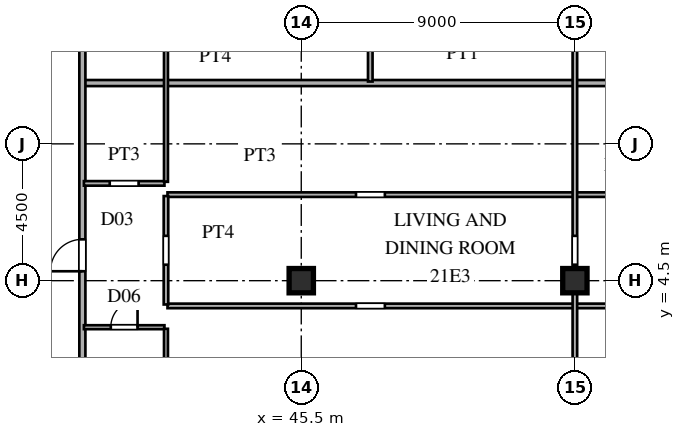
"""IFC4 building model, lengths in metres.
Left out: names, types, materials, properties, quantities, classifications, styles, units other than length and angle.
Written with IfcOpenShell. Run it as: python <this file> out.ifc"""

import sys

from ifc_helpers import new_model, si_unit, direction, frame, frame_2d, origin, origin_2d, place, context, subcontext, project, spatial, rectangle, i_section, extrude, source, transform, mapped, element, fill, save


model = new_model("IFC4")
c1 = context("Model", 3, precision=1e-05, world=origin(), true_north=direction((0.0, 1.0)))
c2 = subcontext(c1, "Body", "Model", "MODEL_VIEW")
j1 = project(units=[si_unit("LENGTHUNIT", "METRE"), si_unit("PLANEANGLEUNIT", "RADIAN")], contexts=[c1])
p1 = place(None, origin())
s1 = spatial("IfcSite", under=j1, at=p1, CompositionType="ELEMENT")
p2 = place(p1, origin())
s2 = spatial("IfcBuilding", under=s1, at=p2, CompositionType="ELEMENT")
p3 = place(p2, frame((0.0, 0.0, 80.1)))
s3 = spatial("IfcBuildingStorey", under=s2, at=p3, CompositionType="ELEMENT", Elevation=80.1)
m1 = source(origin(), c2, "Body", "SweptSolid", [
    extrude(i_section(OverallWidth=0.8, OverallDepth=0.8, WebThickness=0.032, FlangeThickness=0.05, at=origin_2d()), origin(), (0.0, 0.0, 1.0), 3.6),
])
for number, where, z_axis, x_axis in (
    (1, (45.5, 4.5, 0.0), (0.0, 0.0, 1.0), (1.0, 0.0, 0.0)),
    (2, (54.5, 4.5, 0.0), (0.0, 0.0, 1.0), (1.0, 0.0, 0.0)),
):
    element("IfcColumn", number, at=place(p3, frame(where, z_axis=z_axis, x_axis=x_axis)), inside=s3, PredefinedType="COLUMN", context=c2, shape_type="MappedRepresentation", body=[
        mapped(m1, transform((0.0, 0.0, 0.0), scale=1.0)),
    ])
p4 = place(p3, frame((38.35, 2.97, 0.0), z_axis=(0.0, 0.0, 1.0), x_axis=(1.0, 0.0, 0.0)))
e3 = element("IfcWall", 3, at=p4, inside=s3, PredefinedType="PARTITIONING", context=c2, shape_type="SweptSolid", body=[
    extrude(rectangle(XDim=2.65, YDim=0.13, at=frame_2d((1.325, 0.0))), origin(), (0.0, 0.0, 1.0), 3.38),
])
p5 = place(p4, frame((0.885, 0.0, 0.0)))
e4 = element("IfcOpeningElement", 4, at=p5, cuts=e3, PredefinedType="OPENING", context=c2, shape_type="SweptSolid", body=[
    extrude(rectangle(XDim=0.88, YDim=2.1, at=frame_2d((0.44, 1.05))), frame((0.0, 0.075, 0.0), z_axis=(0.0, -1.0, 0.0), x_axis=(1.0, 0.0, 0.0)), (0.0, 0.0, 1.0), 0.15),
])
p6 = place(p3, frame((41.1, 3.67, 0.0), z_axis=(0.0, 0.0, 1.0), x_axis=(1.0, 0.0, 0.0)))
e5 = element("IfcWall", 5, at=p6, inside=s3, PredefinedType="PARTITIONING", context=c2, shape_type="SweptSolid", body=[
    extrude(rectangle(XDim=29.935, YDim=0.15, at=frame_2d((14.967, 0.0))), origin(), (0.0, 0.0, 1.0), 3.38),
])
p7 = place(p6, frame((6.2, 0.0, 0.0)))
e6 = element("IfcOpeningElement", 6, at=p7, cuts=e5, PredefinedType="OPENING", context=c2, shape_type="SweptSolid", body=[
    extrude(rectangle(XDim=0.95, YDim=2.15, at=frame_2d((0.475, 1.075))), frame((0.0, 0.085, 0.0), z_axis=(0.0, -1.0, 0.0), x_axis=(1.0, 0.0, 0.0)), (0.0, 0.0, 1.0), 0.17),
])
p8 = place(p6, frame((15.775, 0.0, 0.0)))
e7 = element("IfcOpeningElement", 7, at=p8, cuts=e5, PredefinedType="OPENING", context=c2, shape_type="SweptSolid", body=[
    extrude(rectangle(XDim=0.95, YDim=2.15, at=frame_2d((0.475, 1.075))), frame((0.0, 0.085, 0.0), z_axis=(0.0, -1.0, 0.0), x_axis=(1.0, 0.0, 0.0)), (0.0, 0.0, 1.0), 0.17),
])
p9 = place(p3, frame((41.1, 7.33, 0.0), z_axis=(0.0, 0.0, 1.0), x_axis=(1.0, 0.0, 0.0)))
e8 = element("IfcWall", 8, at=p9, inside=s3, PredefinedType="PARTITIONING", context=c2, shape_type="SweptSolid", body=[
    extrude(rectangle(XDim=29.775, YDim=0.15, at=frame_2d((14.887, 0.0))), origin(), (0.0, 0.0, 1.0), 3.38),
])
p10 = place(p9, frame((6.2, 0.0, 0.0)))
e9 = element("IfcOpeningElement", 9, at=p10, cuts=e8, PredefinedType="OPENING", context=c2, shape_type="SweptSolid", body=[
    extrude(rectangle(XDim=0.95, YDim=2.15, at=frame_2d((0.475, 1.075))), frame((0.0, 0.085, 0.0), z_axis=(0.0, -1.0, 0.0), x_axis=(1.0, 0.0, 0.0)), (0.0, 0.0, 1.0), 0.17),
])
p11 = place(p9, frame((15.775, 0.0, 0.0)))
e10 = element("IfcOpeningElement", 10, at=p11, cuts=e8, PredefinedType="OPENING", context=c2, shape_type="SweptSolid", body=[
    extrude(rectangle(XDim=0.95, YDim=2.15, at=frame_2d((0.475, 1.075))), frame((0.0, 0.085, 0.0), z_axis=(0.0, -1.0, 0.0), x_axis=(1.0, 0.0, 0.0)), (0.0, 0.0, 1.0), 0.17),
])
p12 = place(p3, frame((38.35, 7.7, 0.0), z_axis=(0.0, 0.0, 1.0), x_axis=(1.0, 0.0, 0.0)))
e11 = element("IfcWall", 11, at=p12, inside=s3, PredefinedType="PARTITIONING", context=c2, shape_type="SweptSolid", body=[
    extrude(rectangle(XDim=2.65, YDim=0.15, at=frame_2d((1.325, 0.0))), origin(), (0.0, 0.0, 1.0), 3.38),
])
p13 = place(p12, frame((0.85, 0.0, 0.0)))
e12 = element("IfcOpeningElement", 12, at=p13, cuts=e11, PredefinedType="OPENING", context=c2, shape_type="SweptSolid", body=[
    extrude(rectangle(XDim=0.95, YDim=2.15, at=frame_2d((0.475, 1.075))), frame((0.0, 0.085, 0.0), z_axis=(0.0, -1.0, 0.0), x_axis=(1.0, 0.0, 0.0)), (0.0, 0.0, 1.0), 0.17),
])
p14 = place(p3, frame((38.38, 11.0, 0.0), z_axis=(0.0, 0.0, 1.0), x_axis=(1.0, 0.0, 0.0)))
e13 = element("IfcWall", 13, at=p14, inside=s3, PredefinedType="PARTITIONING", context=c2, shape_type="SweptSolid", body=[
    extrude(rectangle(XDim=24.854, YDim=0.2, at=frame_2d((12.427, 0.0))), origin(), (0.0, 0.0, 1.0), 3.38),
])
p15 = place(p3, frame((38.3, -15.515, 0.0), z_axis=(0.0, 0.0, 1.0), x_axis=(0.0, 1.0, 0.0)))
e14 = element("IfcWall", 14, at=p15, inside=s3, PredefinedType="PARTITIONING", context=c2, shape_type="SweptSolid", body=[
    extrude(rectangle(XDim=31.03, YDim=0.2, at=frame_2d((15.515, 0.0))), origin(), (0.0, 0.0, 1.0), 3.38),
])
p16 = place(p15, frame((0.16, 0.0, 0.0)))
e15 = element("IfcOpeningElement", 15, at=p16, cuts=e14, PredefinedType="OPENING", context=c2, shape_type="SweptSolid", body=[
    extrude(rectangle(XDim=1.05, YDim=2.25, at=frame_2d((0.525, 1.125))), frame((0.0, 0.11, 0.0), z_axis=(0.0, -1.0, 0.0), x_axis=(1.0, 0.0, 0.0)), (0.0, 0.0, 1.0), 0.22),
])
p17 = place(p15, frame((9.067, 0.0, 0.0)))
e16 = element("IfcOpeningElement", 16, at=p17, cuts=e14, PredefinedType="OPENING", context=c2, shape_type="SweptSolid", body=[
    extrude(rectangle(XDim=1.05, YDim=2.25, at=frame_2d((0.525, 1.125))), frame((0.0, 0.11, 0.0), z_axis=(0.0, -1.0, 0.0), x_axis=(1.0, 0.0, 0.0)), (0.0, 0.0, 1.0), 0.22),
])
p18 = place(p15, frame((20.325, 0.0, 0.0)))
e17 = element("IfcOpeningElement", 17, at=p18, cuts=e14, PredefinedType="OPENING", context=c2, shape_type="SweptSolid", body=[
    extrude(rectangle(XDim=1.05, YDim=2.25, at=frame_2d((0.525, 1.125))), frame((0.0, 0.11, 0.0), z_axis=(0.0, -1.0, 0.0), x_axis=(1.0, 0.0, 0.0)), (0.0, 0.0, 1.0), 0.22),
])
p19 = place(p15, frame((29.613, 0.0, 0.0)))
e18 = element("IfcOpeningElement", 18, at=p19, cuts=e14, PredefinedType="OPENING", context=c2, shape_type="SweptSolid", body=[
    extrude(rectangle(XDim=1.05, YDim=2.25, at=frame_2d((0.525, 1.125))), frame((0.0, 0.11, 0.0), z_axis=(0.0, -1.0, 0.0), x_axis=(1.0, 0.0, 0.0)), (0.0, 0.0, 1.0), 0.22),
])
p20 = place(p3, frame((41.05, -3.398, 0.0), z_axis=(0.0, 0.0, 1.0), x_axis=(0.0, 1.0, 0.0)))
e19 = element("IfcWall", 19, at=p20, inside=s3, PredefinedType="PARTITIONING", context=c2, shape_type="SweptSolid", body=[
    extrude(rectangle(XDim=6.316, YDim=0.13, at=frame_2d((3.158, 0.0))), origin(), (0.0, 0.0, 1.0), 2.99),
])
p21 = place(p3, frame((41.05, 3.717, 0.0), z_axis=(0.0, 0.0, 1.0), x_axis=(0.0, 1.0, 0.0)))
e20 = element("IfcWall", 20, at=p21, inside=s3, PredefinedType="PARTITIONING", context=c2, shape_type="SweptSolid", body=[
    extrude(rectangle(XDim=3.566, YDim=0.15, at=frame_2d((1.783, 0.0))), origin(), (0.0, 0.0, 1.0), 2.99),
])
p22 = place(p21, frame((1.308, 0.0, 0.0)))
e21 = element("IfcOpeningElement", 21, at=p22, cuts=e20, PredefinedType="OPENING", context=c2, shape_type="SweptSolid", body=[
    extrude(rectangle(XDim=0.95, YDim=2.15, at=frame_2d((0.475, 1.075))), frame((0.0, 0.085, 0.0), z_axis=(0.0, -1.0, 0.0), x_axis=(1.0, 0.0, 0.0)), (0.0, 0.0, 1.0), 0.17),
])
p23 = place(p3, frame((41.05, 7.752, 0.0), z_axis=(0.0, 0.0, 1.0), x_axis=(0.0, 1.0, 0.0)))
e22 = element("IfcWall", 22, at=p23, inside=s3, PredefinedType="PARTITIONING", context=c2, shape_type="SweptSolid", body=[
    extrude(rectangle(XDim=8.187, YDim=0.13, at=frame_2d((4.094, 0.0))), origin(), (0.0, 0.0, 1.0), 2.99),
])
p24 = place(p23, frame((6.59, 0.0, 0.0)))
e23 = element("IfcOpeningElement", 23, at=p24, cuts=e22, PredefinedType="OPENING", context=c2, shape_type="SweptSolid", body=[
    extrude(rectangle(XDim=0.95, YDim=2.15, at=frame_2d((0.475, 1.075))), frame((0.0, 0.075, 0.0), z_axis=(0.0, -1.0, 0.0), x_axis=(1.0, 0.0, 0.0)), (0.0, 0.0, 1.0), 0.15),
])
p25 = place(p3, frame((47.77, 11.05, 0.0), z_axis=(0.0, 0.0, 1.0), x_axis=(0.0, 1.0, 0.0)))
e24 = element("IfcWall", 24, at=p25, inside=s3, PredefinedType="PARTITIONING", context=c2, shape_type="SweptSolid", body=[
    extrude(rectangle(XDim=4.889, YDim=0.15, at=frame_2d((2.444, 0.0))), origin(), (0.0, 0.0, 1.0), 3.38),
])
p26 = place(p25, frame((1.969, 0.0, 0.0)))
e25 = element("IfcOpeningElement", 25, at=p26, cuts=e24, PredefinedType="OPENING", context=c2, shape_type="SweptSolid", body=[
    extrude(rectangle(XDim=0.95, YDim=2.15, at=frame_2d((0.475, 1.075))), frame((0.0, 0.085, 0.0), z_axis=(0.0, -1.0, 0.0), x_axis=(1.0, 0.0, 0.0)), (0.0, 0.0, 1.0), 0.17),
])
p27 = place(p3, frame((54.5, -14.96, 0.0), z_axis=(0.0, 0.0, 1.0), x_axis=(0.0, 1.0, 0.0)))
e26 = element("IfcWall", 26, at=p27, inside=s3, PredefinedType="PARTITIONING", context=c2, shape_type="SweptSolid", body=[
    extrude(rectangle(XDim=29.92, YDim=0.15, at=frame_2d((14.96, 0.0))), origin(), (0.0, 0.0, 1.0), 2.68),
])
p28 = place(p27, frame((1.272, 0.0, 0.0)))
e27 = element("IfcOpeningElement", 27, at=p28, cuts=e26, PredefinedType="OPENING", context=c2, shape_type="SweptSolid", body=[
    extrude(rectangle(XDim=0.95, YDim=2.15, at=frame_2d((0.475, 1.075))), frame((0.0, 0.085, 0.0), z_axis=(0.0, -1.0, 0.0), x_axis=(1.0, 0.0, 0.0)), (0.0, 0.0, 1.0), 0.17),
])
p29 = place(p27, frame((8.735, 0.0, 0.0)))
e28 = element("IfcOpeningElement", 28, at=p29, cuts=e26, PredefinedType="OPENING", context=c2, shape_type="SweptSolid", body=[
    extrude(rectangle(XDim=0.95, YDim=2.15, at=frame_2d((0.475, 1.075))), frame((0.0, 0.085, 0.0), z_axis=(0.0, -1.0, 0.0), x_axis=(1.0, 0.0, 0.0)), (0.0, 0.0, 1.0), 0.17),
])
p30 = place(p27, frame((19.985, 0.0, 0.0)))
e29 = element("IfcOpeningElement", 29, at=p30, cuts=e26, PredefinedType="OPENING", context=c2, shape_type="SweptSolid", body=[
    extrude(rectangle(XDim=0.95, YDim=2.15, at=frame_2d((0.475, 1.075))), frame((0.0, 0.085, 0.0), z_axis=(0.0, -1.0, 0.0), x_axis=(1.0, 0.0, 0.0)), (0.0, 0.0, 1.0), 0.17),
])
p31 = place(p27, frame((27.448, 0.0, 0.0)))
e30 = element("IfcOpeningElement", 30, at=p31, cuts=e26, PredefinedType="OPENING", context=c2, shape_type="SweptSolid", body=[
    extrude(rectangle(XDim=0.95, YDim=2.15, at=frame_2d((0.475, 1.075))), frame((0.0, 0.085, 0.0), z_axis=(0.0, -1.0, 0.0), x_axis=(1.0, 0.0, 0.0)), (0.0, 0.0, 1.0), 0.17),
])
m2 = source(origin(), c2, "Body", "SweptSolid", [
    extrude(rectangle(XDim=0.88, YDim=2.1, at=frame_2d((0.44, 1.05))), frame((0.0, 0.025, 0.0), z_axis=(0.0, -1.0, 0.0), x_axis=(1.0, 0.0, 0.0)), (0.0, 0.0, 1.0), 0.05),
])
p32 = place(p5, origin())
e31 = element("IfcDoor", 31, at=p32, inside=s3, OperationType="SINGLE_SWING_RIGHT", PredefinedType="DOOR", context=c2, shape_type="MappedRepresentation", body=[
    mapped(m2, transform((0.0, 0.0, 0.0), scale=1.0)),
])
fill(e4, e31)
m3 = source(origin(), c2, "Body", "SweptSolid", [
    extrude(rectangle(XDim=1.05, YDim=2.25, at=frame_2d((0.525, 1.125))), frame((0.0, 0.025, 0.0), z_axis=(0.0, -1.0, 0.0), x_axis=(1.0, 0.0, 0.0)), (0.0, 0.0, 1.0), 0.05),
])
p33 = place(p18, origin())
e32 = element("IfcDoor", 32, at=p33, inside=s3, OperationType="SINGLE_SWING_LEFT", PredefinedType="DOOR", context=c2, shape_type="MappedRepresentation", body=[
    mapped(m3, transform((0.0, 0.0, 0.0), scale=1.0)),
])
fill(e17, e32)
save(model, sys.argv[1])
